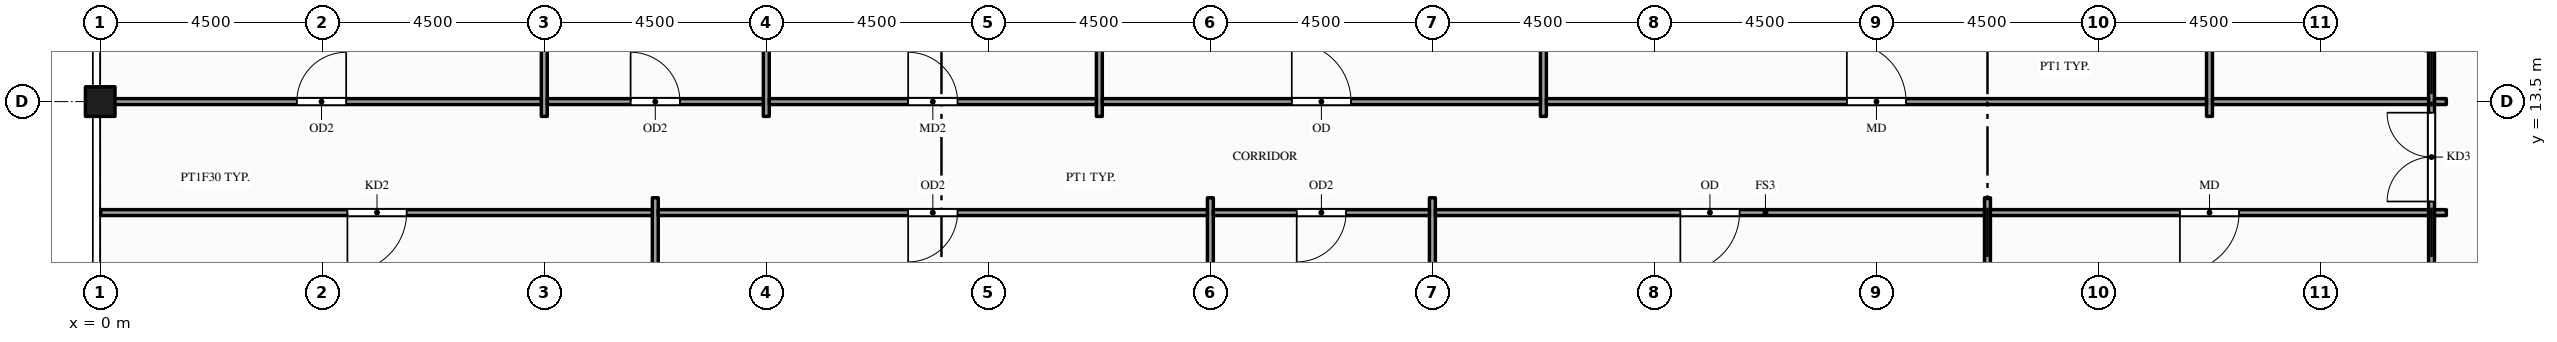
"""IFC4 building model, lengths in metres.
Left out: names, types, materials, properties, quantities, classifications, styles, units other than length and angle.
Written with IfcOpenShell. Run it as: python <this file> out.ifc"""

import sys

from ifc_helpers import new_model, si_unit, direction, frame, frame_2d, origin, origin_2d, place, context, subcontext, project, spatial, rectangle, hollow_rectangle, extrude, element, fill, save


model = new_model("IFC4")
c1 = context("Model", 3, precision=1e-05, world=origin(), true_north=direction((0.0, 1.0)))
c2 = subcontext(c1, "Body", "Model", "MODEL_VIEW")
j1 = project(units=[si_unit("LENGTHUNIT", "METRE"), si_unit("PLANEANGLEUNIT", "RADIAN")], contexts=[c1])
p1 = place(None, origin())
s1 = spatial("IfcSite", under=j1, at=p1, CompositionType="ELEMENT")
p2 = place(p1, origin())
s2 = spatial("IfcBuilding", under=s1, at=p2, CompositionType="ELEMENT")
p3 = place(p2, frame((0.0, 0.0, 323.0)))
s3 = spatial("IfcBuildingStorey", under=s2, at=p3, CompositionType="ELEMENT", Elevation=323.0)
p4 = place(p3, frame((0.0, 13.5, -0.15), z_axis=(0.0, 0.0, 1.0), x_axis=(1.0, 0.0, 0.0)))
e1 = element("IfcColumn", 1, at=p4, inside=s3, PredefinedType="COLUMN", context=c2, shape_type="SweptSolid", body=[
    extrude(hollow_rectangle(XDim=0.6, YDim=0.6, WallThickness=0.03, at=origin_2d()), origin(), (0.0, 0.0, 1.0), 4.5),
])
p5 = place(p3, frame((9.0, 13.2, 0.0), z_axis=(0.0, 0.0, 1.0), x_axis=(0.0, 1.0, 0.0)))
e2 = element("IfcWall", 2, at=p5, inside=s3, PredefinedType="PARTITIONING", context=c2, shape_type="SweptSolid", body=[
    extrude(rectangle(XDim=9.29, YDim=0.12, at=frame_2d((4.645, 0.0))), origin(), (0.0, 0.0, 1.0), 3.359),
])
p6 = place(p3, frame((11.25, 0.01, 0.0), z_axis=(0.0, 0.0, 1.0), x_axis=(0.0, 1.0, 0.0)))
e3 = element("IfcWall", 3, at=p6, inside=s3, PredefinedType="PARTITIONING", context=c2, shape_type="SweptSolid", body=[
    extrude(rectangle(XDim=11.54, YDim=0.12, at=frame_2d((5.77, 0.0))), origin(), (0.0, 0.0, 1.0), 3.359),
])
for number, where, z_axis, x_axis in (
    (4, (13.5, 13.2, 0.0), (0.0, 0.0, 1.0), (0.0, 1.0, 0.0)),
    (5, (20.25, 13.2, 0.0), (0.0, 0.0, 1.0), (0.0, 1.0, 0.0)),
):
    element("IfcWall", number, at=place(p3, frame(where, z_axis=z_axis, x_axis=x_axis)), inside=s3, PredefinedType="PARTITIONING", context=c2, shape_type="SweptSolid", body=[
        extrude(rectangle(XDim=9.29, YDim=0.12, at=frame_2d((4.645, 0.0))), origin(), (0.0, 0.0, 1.0), 3.359),
    ])
for number, where, z_axis, x_axis in (
    (6, (22.5, 0.01, 0.0), (0.0, 0.0, 1.0), (0.0, 1.0, 0.0)),
    (7, (27.0, 0.01, 0.0), (0.0, 0.0, 1.0), (0.0, 1.0, 0.0)),
):
    element("IfcWall", number, at=place(p3, frame(where, z_axis=z_axis, x_axis=x_axis)), inside=s3, PredefinedType="PARTITIONING", context=c2, shape_type="SweptSolid", body=[
        extrude(rectangle(XDim=11.54, YDim=0.12, at=frame_2d((5.77, 0.0))), origin(), (0.0, 0.0, 1.0), 3.359),
    ])
p7 = place(p3, frame((29.25, 13.2, 0.0), z_axis=(0.0, 0.0, 1.0), x_axis=(0.0, 1.0, 0.0)))
e8 = element("IfcWall", 8, at=p7, inside=s3, PredefinedType="PARTITIONING", context=c2, shape_type="SweptSolid", body=[
    extrude(rectangle(XDim=9.29, YDim=0.12, at=frame_2d((4.645, 0.0))), origin(), (0.0, 0.0, 1.0), 3.359),
])
p8 = place(p3, frame((38.25, 0.01, 0.0), z_axis=(0.0, 0.0, 1.0), x_axis=(0.0, 1.0, 0.0)))
e9 = element("IfcWall", 9, at=p8, inside=s3, PredefinedType="PARTITIONING", context=c2, shape_type="SweptSolid", body=[
    extrude(rectangle(XDim=11.54, YDim=0.12, at=frame_2d((5.77, 0.0))), origin(), (0.0, 0.0, 1.0), 3.359),
])
p9 = place(p3, frame((42.75, 13.2, 0.0), z_axis=(0.0, 0.0, 1.0), x_axis=(0.0, 1.0, 0.0)))
e10 = element("IfcWall", 10, at=p9, inside=s3, PredefinedType="PARTITIONING", context=c2, shape_type="SweptSolid", body=[
    extrude(rectangle(XDim=9.29, YDim=0.12, at=frame_2d((4.645, 0.0))), origin(), (0.0, 0.0, 1.0), 3.359),
])
p10 = place(p3, frame((47.25, 0.01, 0.0), z_axis=(0.0, 0.0, 1.0), x_axis=(0.0, 1.0, 0.0)))
e11 = element("IfcWall", 11, at=p10, inside=s3, PredefinedType="PARTITIONING", context=c2, shape_type="SweptSolid", body=[
    extrude(rectangle(XDim=22.48, YDim=0.12, at=frame_2d((11.24, 0.0))), origin(), (0.0, 0.0, 1.0), 3.359),
])
p11 = place(p10, frame((11.465, 0.0, 0.0)))
e12 = element("IfcOpeningElement", 12, at=p11, cuts=e11, PredefinedType="OPENING", context=c2, shape_type="SweptSolid", body=[
    extrude(rectangle(XDim=1.8, YDim=2.1, at=frame_2d((0.9, 1.05))), frame((0.0, 0.07, 0.0), z_axis=(0.0, -1.0, 0.0), x_axis=(1.0, 0.0, 0.0)), (0.0, 0.0, 1.0), 0.14),
])
p12 = place(p10, frame((14.49, 0.0, 0.0)))
e13 = element("IfcOpeningElement", 13, at=p12, cuts=e11, PredefinedType="OPENING", context=c2, shape_type="SweptSolid", body=[
    extrude(rectangle(XDim=0.9, YDim=2.1, at=frame_2d((0.45, 1.05))), frame((0.0, 0.07, 0.0), z_axis=(0.0, -1.0, 0.0), x_axis=(1.0, 0.0, 0.0)), (0.0, 0.0, 1.0), 0.14),
])
p13 = place(p10, frame((17.54, 0.0, 0.0)))
e14 = element("IfcOpeningElement", 14, at=p13, cuts=e11, PredefinedType="OPENING", context=c2, shape_type="SweptSolid", body=[
    extrude(rectangle(XDim=0.9, YDim=2.1, at=frame_2d((0.45, 1.05))), frame((0.0, 0.07, 0.0), z_axis=(0.0, -1.0, 0.0), x_axis=(1.0, 0.0, 0.0)), (0.0, 0.0, 1.0), 0.14),
])
p14 = place(p10, frame((20.49, 0.0, 0.0)))
e15 = element("IfcOpeningElement", 15, at=p14, cuts=e11, PredefinedType="OPENING", context=c2, shape_type="SweptSolid", body=[
    extrude(rectangle(XDim=1.0, YDim=2.1, at=frame_2d((0.5, 1.05))), frame((0.0, 0.07, 0.0), z_axis=(0.0, -1.0, 0.0), x_axis=(1.0, 0.0, 0.0)), (0.0, 0.0, 1.0), 0.14),
])
p15 = place(p3, frame((0.01, 11.25, 0.0), z_axis=(0.0, 0.0, 1.0), x_axis=(1.0, 0.0, 0.0)))
e16 = element("IfcWall", 16, at=p15, inside=s3, PredefinedType="PARTITIONING", context=c2, shape_type="SweptSolid", body=[
    extrude(rectangle(XDim=11.18, YDim=0.12, at=frame_2d((5.59, 0.0))), origin(), (0.0, 0.0, 1.0), 3.359),
])
p16 = place(p15, frame((5.0, 0.0, 0.0)))
e17 = element("IfcOpeningElement", 17, at=p16, cuts=e16, PredefinedType="OPENING", context=c2, shape_type="SweptSolid", body=[
    extrude(rectangle(XDim=1.2, YDim=2.1, at=frame_2d((0.6, 1.05))), frame((0.0, 0.07, 0.0), z_axis=(0.0, -1.0, 0.0), x_axis=(1.0, 0.0, 0.0)), (0.0, 0.0, 1.0), 0.14),
])
p17 = place(p3, frame((11.31, 11.25, 0.0), z_axis=(0.0, 0.0, 1.0), x_axis=(1.0, 0.0, 0.0)))
e18 = element("IfcWall", 18, at=p17, inside=s3, PredefinedType="PARTITIONING", context=c2, shape_type="SweptSolid", body=[
    extrude(rectangle(XDim=11.13, YDim=0.12, at=frame_2d((5.565, 0.0))), origin(), (0.0, 0.0, 1.0), 3.359),
])
p18 = place(p17, frame((5.065, 0.0, 0.0)))
e19 = element("IfcOpeningElement", 19, at=p18, cuts=e18, PredefinedType="OPENING", context=c2, shape_type="SweptSolid", body=[
    extrude(rectangle(XDim=1.0, YDim=2.1, at=frame_2d((0.5, 1.05))), frame((0.0, 0.07, 0.0), z_axis=(0.0, -1.0, 0.0), x_axis=(1.0, 0.0, 0.0)), (0.0, 0.0, 1.0), 0.14),
])
p19 = place(p3, frame((22.56, 11.25, 0.0), z_axis=(0.0, 0.0, 1.0), x_axis=(1.0, 0.0, 0.0)))
e20 = element("IfcWall", 20, at=p19, inside=s3, PredefinedType="PARTITIONING", context=c2, shape_type="SweptSolid", body=[
    extrude(rectangle(XDim=4.38, YDim=0.12, at=frame_2d((2.19, 0.0))), origin(), (0.0, 0.0, 1.0), 3.359),
])
p20 = place(p19, frame((1.69, 0.0, 0.0)))
e21 = element("IfcOpeningElement", 21, at=p20, cuts=e20, PredefinedType="OPENING", context=c2, shape_type="SweptSolid", body=[
    extrude(rectangle(XDim=1.0, YDim=2.1, at=frame_2d((0.5, 1.05))), frame((0.0, 0.07, 0.0), z_axis=(0.0, -1.0, 0.0), x_axis=(1.0, 0.0, 0.0)), (0.0, 0.0, 1.0), 0.14),
])
p21 = place(p3, frame((27.06, 11.25, 0.0), z_axis=(0.0, 0.0, 1.0), x_axis=(1.0, 0.0, 0.0)))
e22 = element("IfcWall", 22, at=p21, inside=s3, PredefinedType="PARTITIONING", context=c2, shape_type="SweptSolid", body=[
    extrude(rectangle(XDim=11.13, YDim=0.12, at=frame_2d((5.565, 0.0))), origin(), (0.0, 0.0, 1.0), 3.359),
])
p22 = place(p21, frame((4.965, 0.0, 0.0)))
e23 = element("IfcOpeningElement", 23, at=p22, cuts=e22, PredefinedType="OPENING", context=c2, shape_type="SweptSolid", body=[
    extrude(rectangle(XDim=1.2, YDim=2.1, at=frame_2d((0.6, 1.05))), frame((0.0, 0.07, 0.0), z_axis=(0.0, -1.0, 0.0), x_axis=(1.0, 0.0, 0.0)), (0.0, 0.0, 1.0), 0.14),
])
p23 = place(p3, frame((38.31, 11.25, 0.0), z_axis=(0.0, 0.0, 1.0), x_axis=(1.0, 0.0, 0.0)))
e24 = element("IfcWall", 24, at=p23, inside=s3, PredefinedType="PARTITIONING", context=c2, shape_type="SweptSolid", body=[
    extrude(rectangle(XDim=8.88, YDim=0.12, at=frame_2d((4.44, 0.0))), origin(), (0.0, 0.0, 1.0), 3.359),
])
p24 = place(p23, frame((3.84, 0.0, 0.0)))
e25 = element("IfcOpeningElement", 25, at=p24, cuts=e24, PredefinedType="OPENING", context=c2, shape_type="SweptSolid", body=[
    extrude(rectangle(XDim=1.2, YDim=2.1, at=frame_2d((0.6, 1.05))), frame((0.0, 0.07, 0.0), z_axis=(0.0, -1.0, 0.0), x_axis=(1.0, 0.0, 0.0)), (0.0, 0.0, 1.0), 0.14),
])
p25 = place(p3, frame((47.31, 11.25, 0.0), z_axis=(0.0, 0.0, 1.0), x_axis=(1.0, 0.0, 0.0)))
e26 = element("IfcWall", 26, at=p25, inside=s3, PredefinedType="PARTITIONING", context=c2, shape_type="SweptSolid", body=[
    extrude(rectangle(XDim=0.24, YDim=0.12, at=frame_2d((0.12, 0.0))), origin(), (0.0, 0.0, 1.0), 3.359),
])
p26 = place(p3, frame((0.01, 13.5, 0.0), z_axis=(0.0, 0.0, 1.0), x_axis=(1.0, 0.0, 0.0)))
e27 = element("IfcWall", 27, at=p26, inside=s3, PredefinedType="PARTITIONING", context=c2, shape_type="SweptSolid", body=[
    extrude(rectangle(XDim=8.93, YDim=0.12, at=frame_2d((4.465, 0.0))), origin(), (0.0, 0.0, 1.0), 3.359),
])
p27 = place(p26, frame((3.975, 0.0, 0.0)))
e28 = element("IfcOpeningElement", 28, at=p27, cuts=e27, PredefinedType="OPENING", context=c2, shape_type="SweptSolid", body=[
    extrude(rectangle(XDim=1.0, YDim=2.1, at=frame_2d((0.5, 1.05))), frame((0.0, 0.07, 0.0), z_axis=(0.0, -1.0, 0.0), x_axis=(1.0, 0.0, 0.0)), (0.0, 0.0, 1.0), 0.14),
])
p28 = place(p3, frame((9.06, 13.5, 0.0), z_axis=(0.0, 0.0, 1.0), x_axis=(1.0, 0.0, 0.0)))
e29 = element("IfcWall", 29, at=p28, inside=s3, PredefinedType="PARTITIONING", context=c2, shape_type="SweptSolid", body=[
    extrude(rectangle(XDim=4.38, YDim=0.12, at=frame_2d((2.19, 0.0))), origin(), (0.0, 0.0, 1.0), 3.359),
])
p29 = place(p28, frame((1.69, 0.0, 0.0)))
e30 = element("IfcOpeningElement", 30, at=p29, cuts=e29, PredefinedType="OPENING", context=c2, shape_type="SweptSolid", body=[
    extrude(rectangle(XDim=1.0, YDim=2.1, at=frame_2d((0.5, 1.05))), frame((0.0, 0.07, 0.0), z_axis=(0.0, -1.0, 0.0), x_axis=(1.0, 0.0, 0.0)), (0.0, 0.0, 1.0), 0.14),
])
p30 = place(p3, frame((13.56, 13.5, 0.0), z_axis=(0.0, 0.0, 1.0), x_axis=(1.0, 0.0, 0.0)))
e31 = element("IfcWall", 31, at=p30, inside=s3, PredefinedType="PARTITIONING", context=c2, shape_type="SweptSolid", body=[
    extrude(rectangle(XDim=6.63, YDim=0.12, at=frame_2d((3.315, 0.0))), origin(), (0.0, 0.0, 1.0), 3.359),
])
p31 = place(p30, frame((2.815, 0.0, 0.0)))
e32 = element("IfcOpeningElement", 32, at=p31, cuts=e31, PredefinedType="OPENING", context=c2, shape_type="SweptSolid", body=[
    extrude(rectangle(XDim=1.0, YDim=2.1, at=frame_2d((0.5, 1.05))), frame((0.0, 0.07, 0.0), z_axis=(0.0, -1.0, 0.0), x_axis=(1.0, 0.0, 0.0)), (0.0, 0.0, 1.0), 0.14),
])
p32 = place(p3, frame((20.31, 13.5, 0.0), z_axis=(0.0, 0.0, 1.0), x_axis=(1.0, 0.0, 0.0)))
e33 = element("IfcWall", 33, at=p32, inside=s3, PredefinedType="PARTITIONING", context=c2, shape_type="SweptSolid", body=[
    extrude(rectangle(XDim=8.88, YDim=0.12, at=frame_2d((4.44, 0.0))), origin(), (0.0, 0.0, 1.0), 3.359),
])
p33 = place(p32, frame((3.84, 0.0, 0.0)))
e34 = element("IfcOpeningElement", 34, at=p33, cuts=e33, PredefinedType="OPENING", context=c2, shape_type="SweptSolid", body=[
    extrude(rectangle(XDim=1.2, YDim=2.1, at=frame_2d((0.6, 1.05))), frame((0.0, 0.07, 0.0), z_axis=(0.0, -1.0, 0.0), x_axis=(1.0, 0.0, 0.0)), (0.0, 0.0, 1.0), 0.14),
])
p34 = place(p3, frame((29.31, 13.5, 0.0), z_axis=(0.0, 0.0, 1.0), x_axis=(1.0, 0.0, 0.0)))
e35 = element("IfcWall", 35, at=p34, inside=s3, PredefinedType="PARTITIONING", context=c2, shape_type="SweptSolid", body=[
    extrude(rectangle(XDim=13.38, YDim=0.12, at=frame_2d((6.69, 0.0))), origin(), (0.0, 0.0, 1.0), 3.359),
])
p35 = place(p34, frame((6.09, 0.0, 0.0)))
e36 = element("IfcOpeningElement", 36, at=p35, cuts=e35, PredefinedType="OPENING", context=c2, shape_type="SweptSolid", body=[
    extrude(rectangle(XDim=1.2, YDim=2.1, at=frame_2d((0.6, 1.05))), frame((0.0, 0.07, 0.0), z_axis=(0.0, -1.0, 0.0), x_axis=(1.0, 0.0, 0.0)), (0.0, 0.0, 1.0), 0.14),
])
p36 = place(p3, frame((42.81, 13.5, 0.0), z_axis=(0.0, 0.0, 1.0), x_axis=(1.0, 0.0, 0.0)))
e37 = element("IfcWall", 37, at=p36, inside=s3, PredefinedType="PARTITIONING", context=c2, shape_type="SweptSolid", body=[
    extrude(rectangle(XDim=4.38, YDim=0.12, at=frame_2d((2.19, 0.0))), origin(), (0.0, 0.0, 1.0), 3.359),
])
p37 = place(p3, frame((47.31, 13.5, 0.0), z_axis=(0.0, 0.0, 1.0), x_axis=(1.0, 0.0, 0.0)))
e38 = element("IfcWall", 38, at=p37, inside=s3, PredefinedType="PARTITIONING", context=c2, shape_type="SweptSolid", body=[
    extrude(rectangle(XDim=0.24, YDim=0.12, at=frame_2d((0.12, 0.0))), origin(), (0.0, 0.0, 1.0), 3.359),
])
p38 = place(p11, origin())
e39 = element("IfcDoor", 39, at=p38, inside=s3, OperationType="DOUBLE_DOOR_SINGLE_SWING", PredefinedType="DOOR", context=c2, shape_type="SweptSolid", body=[
    extrude(rectangle(XDim=1.8, YDim=2.1, at=frame_2d((0.9, 1.05))), frame((0.0, 0.025, 0.0), z_axis=(0.0, -1.0, 0.0), x_axis=(1.0, 0.0, 0.0)), (0.0, 0.0, 1.0), 0.05),
])
fill(e12, e39)
p39 = place(p16, origin())
e40 = element("IfcDoor", 40, at=p39, inside=s3, OperationType="SINGLE_SWING_LEFT", PredefinedType="DOOR", context=c2, shape_type="SweptSolid", body=[
    extrude(rectangle(XDim=1.2, YDim=2.1, at=frame_2d((0.6, 1.05))), frame((0.0, 0.025, 0.0), z_axis=(0.0, -1.0, 0.0), x_axis=(1.0, 0.0, 0.0)), (0.0, 0.0, 1.0), 0.05),
])
fill(e17, e40)
p40 = place(p18, origin())
e41 = element("IfcDoor", 41, at=p40, inside=s3, OperationType="SINGLE_SWING_LEFT", PredefinedType="DOOR", context=c2, shape_type="SweptSolid", body=[
    extrude(rectangle(XDim=1.0, YDim=2.1, at=frame_2d((0.5, 1.05))), frame((0.0, 0.025, 0.0), z_axis=(0.0, -1.0, 0.0), x_axis=(1.0, 0.0, 0.0)), (0.0, 0.0, 1.0), 0.05),
])
fill(e19, e41)
p41 = place(p20, origin())
e42 = element("IfcDoor", 42, at=p41, inside=s3, OperationType="SINGLE_SWING_LEFT", PredefinedType="DOOR", context=c2, shape_type="SweptSolid", body=[
    extrude(rectangle(XDim=1.0, YDim=2.1, at=frame_2d((0.5, 1.05))), frame((0.0, 0.025, 0.0), z_axis=(0.0, -1.0, 0.0), x_axis=(1.0, 0.0, 0.0)), (0.0, 0.0, 1.0), 0.05),
])
fill(e21, e42)
p42 = place(p22, origin())
e43 = element("IfcDoor", 43, at=p42, inside=s3, OperationType="SINGLE_SWING_LEFT", PredefinedType="DOOR", context=c2, shape_type="SweptSolid", body=[
    extrude(rectangle(XDim=1.2, YDim=2.1, at=frame_2d((0.6, 1.05))), frame((0.0, 0.025, 0.0), z_axis=(0.0, -1.0, 0.0), x_axis=(1.0, 0.0, 0.0)), (0.0, 0.0, 1.0), 0.05),
])
fill(e23, e43)
p43 = place(p24, origin())
e44 = element("IfcDoor", 44, at=p43, inside=s3, OperationType="SINGLE_SWING_LEFT", PredefinedType="DOOR", context=c2, shape_type="SweptSolid", body=[
    extrude(rectangle(XDim=1.2, YDim=2.1, at=frame_2d((0.6, 1.05))), frame((0.0, 0.025, 0.0), z_axis=(0.0, -1.0, 0.0), x_axis=(1.0, 0.0, 0.0)), (0.0, 0.0, 1.0), 0.05),
])
fill(e25, e44)
p44 = place(p27, origin())
e45 = element("IfcDoor", 45, at=p44, inside=s3, OperationType="SINGLE_SWING_RIGHT", PredefinedType="DOOR", context=c2, shape_type="SweptSolid", body=[
    extrude(rectangle(XDim=1.0, YDim=2.1, at=frame_2d((0.5, 1.05))), frame((0.0, 0.025, 0.0), z_axis=(0.0, -1.0, 0.0), x_axis=(1.0, 0.0, 0.0)), (0.0, 0.0, 1.0), 0.05),
])
fill(e28, e45)
p45 = place(p29, origin())
e46 = element("IfcDoor", 46, at=p45, inside=s3, OperationType="SINGLE_SWING_LEFT", PredefinedType="DOOR", context=c2, shape_type="SweptSolid", body=[
    extrude(rectangle(XDim=1.0, YDim=2.1, at=frame_2d((0.5, 1.05))), frame((0.0, 0.025, 0.0), z_axis=(0.0, -1.0, 0.0), x_axis=(1.0, 0.0, 0.0)), (0.0, 0.0, 1.0), 0.05),
])
fill(e30, e46)
p46 = place(p31, origin())
e47 = element("IfcDoor", 47, at=p46, inside=s3, OperationType="SINGLE_SWING_LEFT", PredefinedType="DOOR", context=c2, shape_type="SweptSolid", body=[
    extrude(rectangle(XDim=1.0, YDim=2.1, at=frame_2d((0.5, 1.05))), frame((0.0, 0.025, 0.0), z_axis=(0.0, -1.0, 0.0), x_axis=(1.0, 0.0, 0.0)), (0.0, 0.0, 1.0), 0.05),
])
fill(e32, e47)
p47 = place(p33, origin())
e48 = element("IfcDoor", 48, at=p47, inside=s3, OperationType="SINGLE_SWING_LEFT", PredefinedType="DOOR", context=c2, shape_type="SweptSolid", body=[
    extrude(rectangle(XDim=1.2, YDim=2.1, at=frame_2d((0.6, 1.05))), frame((0.0, 0.025, 0.0), z_axis=(0.0, -1.0, 0.0), x_axis=(1.0, 0.0, 0.0)), (0.0, 0.0, 1.0), 0.05),
])
fill(e34, e48)
p48 = place(p35, origin())
e49 = element("IfcDoor", 49, at=p48, inside=s3, OperationType="SINGLE_SWING_LEFT", PredefinedType="DOOR", context=c2, shape_type="SweptSolid", body=[
    extrude(rectangle(XDim=1.2, YDim=2.1, at=frame_2d((0.6, 1.05))), frame((0.0, 0.025, 0.0), z_axis=(0.0, -1.0, 0.0), x_axis=(1.0, 0.0, 0.0)), (0.0, 0.0, 1.0), 0.05),
])
fill(e36, e49)
save(model, sys.argv[1])
